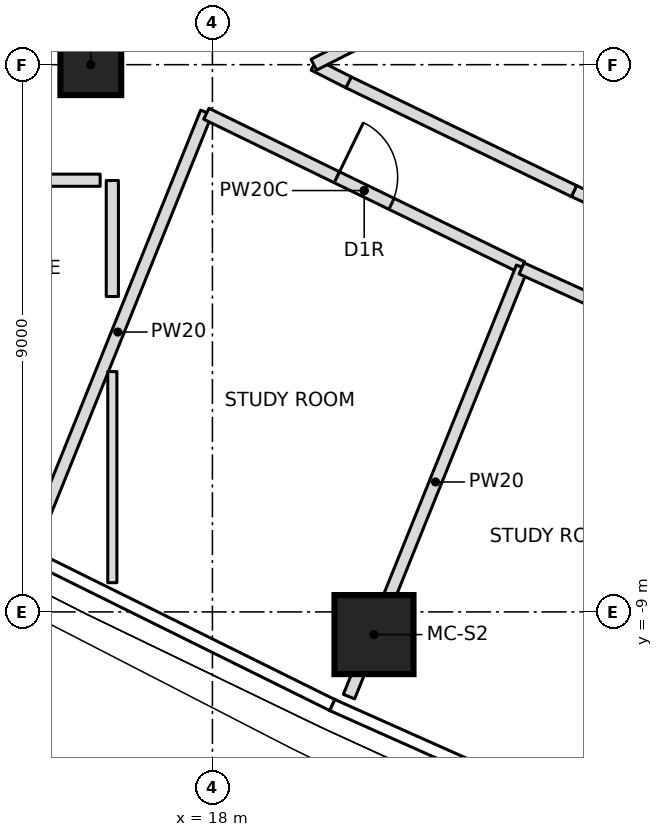
"""IFC4 building model, lengths in metres.
Left out: names, types, materials, properties, quantities, classifications, styles, units other than length and angle.
Written with IfcOpenShell. Run it as: python <this file> out.ifc"""

import sys

from ifc_helpers import new_model, si_unit, direction, frame, frame_2d, origin, origin_2d, place, context, subcontext, project, spatial, rectangle, extrude, element, fill, save


model = new_model("IFC4")
c1 = context("Model", 3, precision=1e-05, world=origin(), true_north=direction((0.0, 1.0)))
c2 = subcontext(c1, "Body", "Model", "MODEL_VIEW")
j1 = project(units=[si_unit("LENGTHUNIT", "METRE"), si_unit("PLANEANGLEUNIT", "RADIAN")], contexts=[c1])
p1 = place(None, origin())
s1 = spatial("IfcSite", under=j1, at=p1, CompositionType="ELEMENT")
p2 = place(p1, origin())
s2 = spatial("IfcBuilding", under=s1, at=p2, CompositionType="ELEMENT")
p3 = place(p2, frame((0.0, 0.0, 170.9)))
s3 = spatial("IfcBuildingStorey", under=s2, at=p3, CompositionType="ELEMENT", Elevation=170.9)
p4 = place(p3, frame((20.657, -9.373, 0.0), z_axis=(0.0, 0.0, 1.0), x_axis=(1.0, 0.0, 0.0)))
e1 = element("IfcColumn", 1, at=p4, inside=s3, PredefinedType="COLUMN", context=c2, shape_type="SweptSolid", body=[
    extrude(rectangle(XDim=1.3, YDim=1.3, at=origin_2d()), origin(), (0.0, 0.0, 1.0), 4.6),
])
p5 = place(p3, frame((16.0, 0.0, 0.0), z_axis=(0.0, 0.0, 1.0), x_axis=(1.0, 0.0, 0.0)))
e2 = element("IfcColumn", 2, at=p5, inside=s3, PredefinedType="COLUMN", context=c2, shape_type="SweptSolid", body=[
    extrude(rectangle(XDim=1.0, YDim=1.0, at=origin_2d()), origin(), (0.0, 0.0, 1.0), 4.6),
])
p6 = place(p3, frame((12.539, -1.9, 0.0), z_axis=(0.0, 0.0, 1.0), x_axis=(1.0, 0.0, 0.0)))
e3 = element("IfcWall", 3, at=p6, inside=s3, PredefinedType="PARTITIONING", context=c2, shape_type="SweptSolid", body=[
    extrude(rectangle(XDim=3.615, YDim=0.2, at=frame_2d((1.808, 0.0))), origin(), (0.0, 0.0, 1.0), 4.3),
])
p7 = place(p6, frame((1.308, 0.0, 0.0)))
e4 = element("IfcOpeningElement", 4, at=p7, cuts=e3, PredefinedType="OPENING", context=c2, shape_type="SweptSolid", body=[
    extrude(rectangle(XDim=1.0, YDim=2.1, at=frame_2d((0.5, 1.05))), frame((0.0, 0.11, 0.0), z_axis=(0.0, -1.0, 0.0), x_axis=(1.0, 0.0, 0.0)), (0.0, 0.0, 1.0), 0.22),
])
p8 = place(p3, frame((14.988, -8.01, 0.0), z_axis=(0.0, 0.0, 1.0), x_axis=(0.373880500059, 0.927476884712, 0.0)))
e5 = element("IfcWall", 5, at=p8, inside=s3, PredefinedType="PARTITIONING", context=c2, shape_type="SweptSolid", body=[
    extrude(rectangle(XDim=7.79, YDim=0.2, at=frame_2d((3.895, 0.0))), origin(), (0.0, 0.0, 1.0), 4.3),
])
p9 = place(p3, frame((17.9, -0.807, 0.0), z_axis=(0.0, 0.0, 1.0), x_axis=(0.899278241665, -0.437377004503, 0.0)))
e6 = element("IfcWall", 6, at=p9, inside=s3, PredefinedType="PARTITIONING", context=c2, shape_type="SweptSolid", body=[
    extrude(rectangle(XDim=5.774, YDim=0.2, at=frame_2d((2.887, 0.0))), origin(), (0.0, 0.0, 1.0), 4.3),
])
p10 = place(p9, frame((2.387, 0.0, 0.0)))
e7 = element("IfcOpeningElement", 7, at=p10, cuts=e6, PredefinedType="OPENING", context=c2, shape_type="SweptSolid", body=[
    extrude(rectangle(XDim=1.0, YDim=2.1, at=frame_2d((0.5, 1.05))), frame((0.0, 0.11, 0.0), z_axis=(0.0, -1.0, 0.0), x_axis=(1.0, 0.0, 0.0)), (0.0, 0.0, 1.0), 0.22),
])
p11 = place(p3, frame((20.246, -10.393, 0.0), z_axis=(0.0, 0.0, 1.0), x_axis=(0.373894034942, 0.927471428473, 0.0)))
e8 = element("IfcWall", 8, at=p11, inside=s3, PredefinedType="PARTITIONING", context=c2, shape_type="SweptSolid", body=[
    extrude(rectangle(XDim=7.613, YDim=0.2, at=frame_2d((3.807, 0.0))), origin(), (0.0, 0.0, 1.0), 4.3),
])
p12 = place(p3, frame((23.085, -3.351, 0.0), z_axis=(0.0, 0.0, 1.0), x_axis=(0.910651275081, -0.413175816322, 0.0)))
e9 = element("IfcWall", 9, at=p12, inside=s3, PredefinedType="PARTITIONING", context=c2, shape_type="SweptSolid", body=[
    extrude(rectangle(XDim=4.312, YDim=0.2, at=frame_2d((2.156, 0.0))), origin(), (0.0, 0.0, 1.0), 4.3),
])
p13 = place(p12, frame((1.656, 0.0, 0.0)))
e10 = element("IfcOpeningElement", 10, at=p13, cuts=e9, PredefinedType="OPENING", context=c2, shape_type="SweptSolid", body=[
    extrude(rectangle(XDim=1.0, YDim=2.1, at=frame_2d((0.5, 1.05))), frame((0.0, 0.11, 0.0), z_axis=(0.0, -1.0, 0.0), x_axis=(1.0, 0.0, 0.0)), (0.0, 0.0, 1.0), 0.22),
])
p14 = place(p3, frame((24.168, -12.185, 0.0), z_axis=(0.0, 0.0, 1.0), x_axis=(0.373913547423, 0.927463562116, 0.0)))
e11 = element("IfcWall", 11, at=p14, inside=s3, PredefinedType="PARTITIONING", context=c2, shape_type="SweptSolid", body=[
    extrude(rectangle(XDim=7.604, YDim=0.2, at=frame_2d((3.802, 0.0))), origin(), (0.0, 0.0, 1.0), 4.3),
])
p15 = place(p3, frame((27.69, -3.793, 0.0), z_axis=(0.0, 0.0, 1.0), x_axis=(-0.909180834404, 0.416401501382, 0.0)))
e12 = element("IfcWall", 12, at=p15, inside=s3, PredefinedType="PARTITIONING", context=c2, shape_type="SweptSolid", body=[
    extrude(rectangle(XDim=4.117, YDim=0.2, at=frame_2d((2.059, 0.0))), origin(), (0.0, 0.0, 1.0), 4.3),
])
p16 = place(p15, frame((1.559, 0.0, 0.0)))
e13 = element("IfcOpeningElement", 13, at=p16, cuts=e12, PredefinedType="OPENING", context=c2, shape_type="SweptSolid", body=[
    extrude(rectangle(XDim=1.0, YDim=2.1, at=frame_2d((0.5, 1.05))), frame((0.0, 0.11, 0.0), z_axis=(0.0, -1.0, 0.0), x_axis=(1.0, 0.0, 0.0)), (0.0, 0.0, 1.0), 0.22),
])
p17 = place(p3, frame((23.947, -2.079, 0.0), z_axis=(0.0, 0.0, 1.0), x_axis=(-0.900613273517, 0.434621365748, 0.0)))
e14 = element("IfcWall", 14, at=p17, inside=s3, PredefinedType="PARTITIONING", context=c2, shape_type="SweptSolid", body=[
    extrude(rectangle(XDim=4.117, YDim=0.2, at=frame_2d((2.059, 0.0))), origin(), (0.0, 0.0, 1.0), 4.3),
])
for number, where, z_axis, x_axis in (
    (15, (20.239, -0.29, 0.0), (0.0, 0.0, 1.0), (-0.892, 0.453, 0.0)),
    (16, (19.668, 0.0, 0.0), (0.0, 0.0, 1.0), (0.892, 0.453, 0.0)),
):
    element("IfcWall", number, at=place(p3, frame(where, z_axis=z_axis, x_axis=x_axis)), inside=s3, PredefinedType="PARTITIONING", context=c2, shape_type="SweptSolid", body=[
        extrude(rectangle(XDim=0.64, YDim=0.2, at=frame_2d((0.32, 0.0))), origin(), (0.0, 0.0, 1.0), 4.3),
    ])
p18 = place(p3, frame((20.239, 0.29, 0.0), z_axis=(0.0, 0.0, 1.0), x_axis=(0.900613273517, 0.434621365748, 0.0)))
e17 = element("IfcWall", 17, at=p18, inside=s3, PredefinedType="PARTITIONING", context=c2, shape_type="SweptSolid", body=[
    extrude(rectangle(XDim=4.117, YDim=0.2, at=frame_2d((2.059, 0.0))), origin(), (0.0, 0.0, 1.0), 4.3),
])
p19 = place(p3, frame((16.354, -5.048, 0.0), z_axis=(0.0, 0.0, 1.0), x_axis=(0.0, -1.0, 0.0)))
e18 = element("IfcWall", 18, at=p19, inside=s3, PredefinedType="PARTITIONING", context=c2, shape_type="SweptSolid", body=[
    extrude(rectangle(XDim=3.471, YDim=0.15, at=frame_2d((1.736, 0.0))), origin(), (0.0, 0.0, 1.0), 4.3),
])
p20 = place(p3, frame((16.354, -1.905, 0.0), z_axis=(0.0, 0.0, 1.0), x_axis=(0.0, -1.0, 0.0)))
e19 = element("IfcWall", 19, at=p20, inside=s3, PredefinedType="PARTITIONING", context=c2, shape_type="SweptSolid", body=[
    extrude(rectangle(XDim=1.907, YDim=0.2, at=frame_2d((0.954, 0.0))), origin(), (0.0, 0.0, 1.0), 4.3),
])
p21 = place(p10, origin())
e20 = element("IfcDoor", 20, at=p21, inside=s3, OperationType="SINGLE_SWING_RIGHT", PredefinedType="DOOR", context=c2, shape_type="SweptSolid", body=[
    extrude(rectangle(XDim=1.0, YDim=2.1, at=frame_2d((0.5, 1.05))), frame((0.0, 0.025, 0.0), z_axis=(0.0, -1.0, 0.0), x_axis=(1.0, 0.0, 0.0)), (0.0, 0.0, 1.0), 0.05),
])
fill(e7, e20)
save(model, sys.argv[1])
